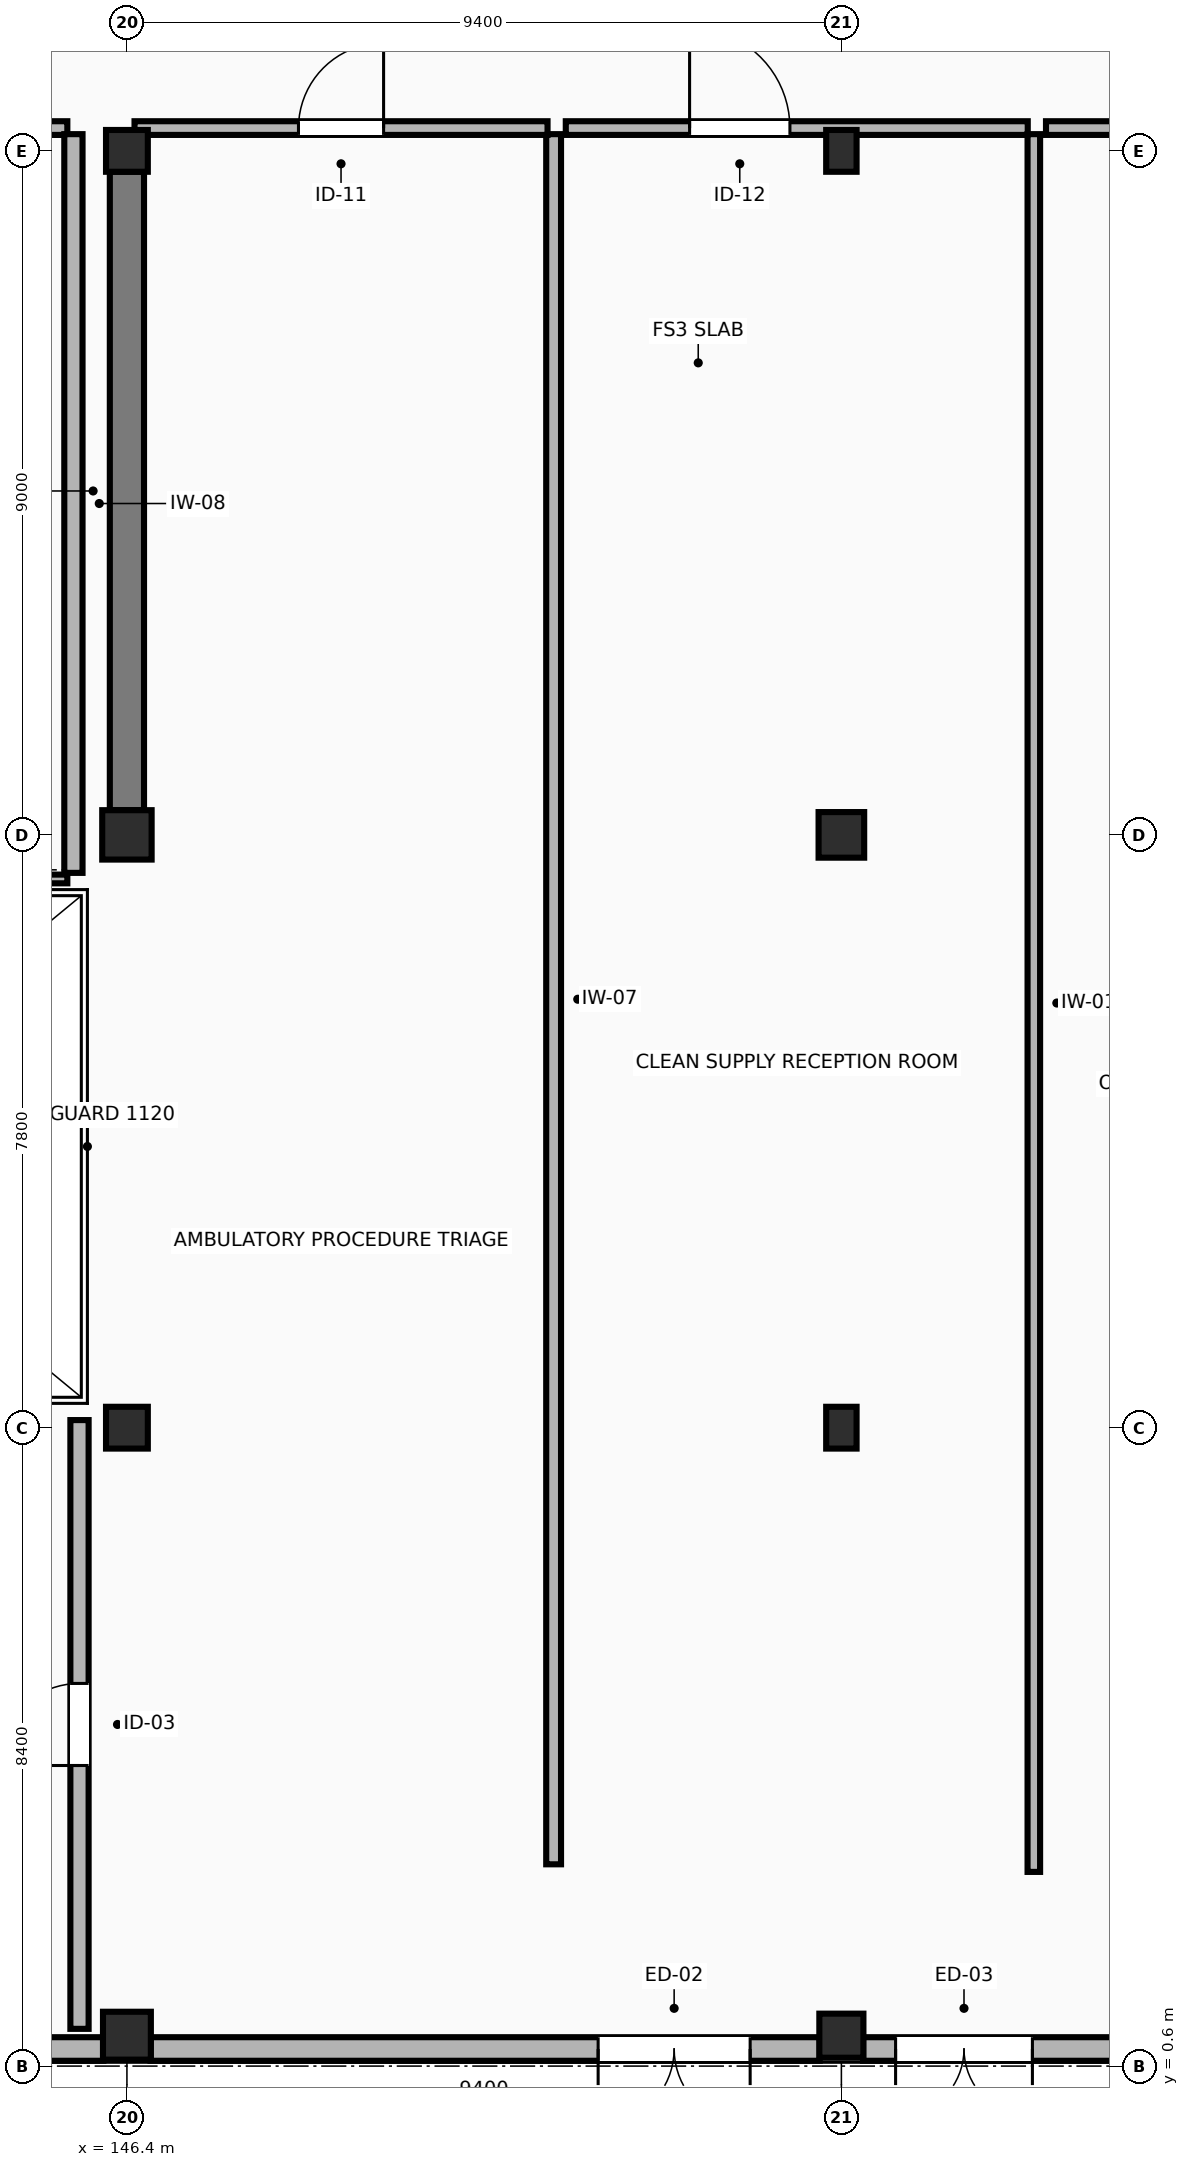
"""IFC4 building model, lengths in metres.
Left out: names, types, materials, properties, quantities, classifications, styles, units other than length and angle.
Written with IfcOpenShell. Run it as: python <this file> out.ifc"""

import sys

from ifc_helpers import new_model, si_unit, direction, frame, frame_2d, origin, origin_2d, place, context, subcontext, project, spatial, rectangle, extrude, element, fill, save


model = new_model("IFC4")
c1 = context("Model", 3, precision=1e-05, world=origin(), true_north=direction((0.0, 1.0)))
c2 = subcontext(c1, "Body", "Model", "MODEL_VIEW")
j1 = project(units=[si_unit("LENGTHUNIT", "METRE"), si_unit("PLANEANGLEUNIT", "RADIAN")], contexts=[c1])
p1 = place(None, origin())
s1 = spatial("IfcSite", under=j1, at=p1, CompositionType="ELEMENT")
p2 = place(p1, origin())
s2 = spatial("IfcBuilding", under=s1, at=p2, CompositionType="ELEMENT")
p3 = place(p2, origin())
s3 = spatial("IfcBuildingStorey", under=s2, at=p3, CompositionType="ELEMENT", Elevation=0.0)
p4 = place(p3, frame((146.4, 1.0, -1.75), z_axis=(0.0, 0.0, 1.0), x_axis=(1.0, 0.0, 0.0)))
e1 = element("IfcColumn", 1, at=p4, inside=s3, PredefinedType="COLUMN", context=c2, shape_type="SweptSolid", body=[
    extrude(rectangle(XDim=0.63, YDim=0.63, at=origin_2d()), origin(), (0.0, 0.0, 1.0), 7.15),
])
p5 = place(p3, frame((146.4, 9.0, -1.75), z_axis=(0.0, 0.0, 1.0), x_axis=(1.0, 0.0, 0.0)))
e2 = element("IfcColumn", 2, at=p5, inside=s3, PredefinedType="COLUMN", context=c2, shape_type="SweptSolid", body=[
    extrude(rectangle(XDim=0.55, YDim=0.55, at=origin_2d()), origin(), (0.0, 0.0, 1.0), 7.15),
])
p6 = place(p3, frame((146.4, 16.8, 0.0), z_axis=(0.0, 0.0, 1.0), x_axis=(1.0, 0.0, 0.0)))
e3 = element("IfcColumn", 3, at=p6, inside=s3, PredefinedType="COLUMN", context=c2, shape_type="SweptSolid", body=[
    extrude(rectangle(XDim=0.65, YDim=0.65, at=origin_2d()), origin(), (0.0, 0.0, 1.0), 5.4),
])
p7 = place(p3, frame((146.4, 25.8, 0.0), z_axis=(0.0, 0.0, 1.0), x_axis=(1.0, 0.0, 0.0)))
e4 = element("IfcColumn", 4, at=p7, inside=s3, PredefinedType="COLUMN", context=c2, shape_type="SweptSolid", body=[
    extrude(rectangle(XDim=0.55, YDim=0.55, at=origin_2d()), origin(), (0.0, 0.0, 1.0), 5.4),
])
p8 = place(p3, frame((155.8, 1.0, -1.75), z_axis=(0.0, 0.0, 1.0), x_axis=(1.0, 0.0, 0.0)))
e5 = element("IfcColumn", 5, at=p8, inside=s3, PredefinedType="COLUMN", context=c2, shape_type="SweptSolid", body=[
    extrude(rectangle(XDim=0.58, YDim=0.58, at=origin_2d()), origin(), (0.0, 0.0, 1.0), 7.15),
])
p9 = place(p3, frame((155.8, 9.0, -1.75), z_axis=(0.0, 0.0, 1.0), x_axis=(1.0, 0.0, 0.0)))
e6 = element("IfcColumn", 6, at=p9, inside=s3, PredefinedType="COLUMN", context=c2, shape_type="SweptSolid", body=[
    extrude(rectangle(XDim=0.4, YDim=0.55, at=origin_2d()), origin(), (0.0, 0.0, 1.0), 7.15),
])
p10 = place(p3, frame((155.8, 16.8, 0.0), z_axis=(0.0, 0.0, 1.0), x_axis=(1.0, 0.0, 0.0)))
e7 = element("IfcColumn", 7, at=p10, inside=s3, PredefinedType="COLUMN", context=c2, shape_type="SweptSolid", body=[
    extrude(rectangle(XDim=0.6, YDim=0.6, at=origin_2d()), origin(), (0.0, 0.0, 1.0), 5.4),
])
p11 = place(p3, frame((155.8, 25.8, 0.0), z_axis=(0.0, 0.0, 1.0), x_axis=(1.0, 0.0, 0.0)))
e8 = element("IfcColumn", 8, at=p11, inside=s3, PredefinedType="COLUMN", context=c2, shape_type="SweptSolid", body=[
    extrude(rectangle(XDim=0.4, YDim=0.55, at=origin_2d()), origin(), (0.0, 0.0, 1.0), 5.4),
])
p12 = place(p3, frame((137.405, 0.825, 0.0), z_axis=(0.0, 0.0, 1.0), x_axis=(1.0, 0.0, 0.0)))
e9 = element("IfcWall", 9, at=p12, inside=s3, PredefinedType="STANDARD", context=c2, shape_type="SweptSolid", body=[
    extrude(rectangle(XDim=8.685, YDim=0.31, at=frame_2d((4.343, 0.0))), origin(), (0.0, 0.0, 1.0), 4.42),
])
p13 = place(p12, frame((3.442, 0.0, 0.95)))
e10 = element("IfcOpeningElement", 10, at=p13, cuts=e9, PredefinedType="OPENING", context=c2, shape_type="SweptSolid", body=[
    extrude(rectangle(XDim=1.8, YDim=1.5, at=frame_2d((0.9, 0.75))), frame((0.0, 0.165, 0.0), z_axis=(0.0, -1.0, 0.0), x_axis=(1.0, 0.0, 0.0)), (0.0, 0.0, 1.0), 0.33),
])
p14 = place(p3, frame((146.71, 0.825, 0.0), z_axis=(0.0, 0.0, 1.0), x_axis=(1.0, 0.0, 0.0)))
e11 = element("IfcWall", 11, at=p14, inside=s3, PredefinedType="STANDARD", context=c2, shape_type="SweptSolid", body=[
    extrude(rectangle(XDim=8.805, YDim=0.31, at=frame_2d((4.402, 0.0))), origin(), (0.0, 0.0, 1.0), 4.42),
])
p15 = place(p14, frame((5.89, 0.0, 0.0)))
e12 = element("IfcOpeningElement", 12, at=p15, cuts=e11, PredefinedType="OPENING", context=c2, shape_type="SweptSolid", body=[
    extrude(rectangle(XDim=2.0, YDim=2.4, at=frame_2d((1.0, 1.2))), frame((0.0, 0.165, 0.0), z_axis=(0.0, -1.0, 0.0), x_axis=(1.0, 0.0, 0.0)), (0.0, 0.0, 1.0), 0.33),
])
p16 = place(p3, frame((156.085, 0.825, 0.0), z_axis=(0.0, 0.0, 1.0), x_axis=(1.0, 0.0, 0.0)))
e13 = element("IfcWall", 13, at=p16, inside=s3, PredefinedType="STANDARD", context=c2, shape_type="SweptSolid", body=[
    extrude(rectangle(XDim=8.355, YDim=0.31, at=frame_2d((4.177, 0.0))), origin(), (0.0, 0.0, 1.0), 4.42),
])
p17 = place(p16, frame((0.428, 0.0, 0.0)))
e14 = element("IfcOpeningElement", 14, at=p17, cuts=e13, PredefinedType="OPENING", context=c2, shape_type="SweptSolid", body=[
    extrude(rectangle(XDim=1.8, YDim=2.3, at=frame_2d((0.9, 1.15))), frame((0.0, 0.165, 0.0), z_axis=(0.0, -1.0, 0.0), x_axis=(1.0, 0.0, 0.0)), (0.0, 0.0, 1.0), 0.33),
])
p18 = place(p3, frame((146.4, 17.125, 0.0), z_axis=(0.0, 0.0, 1.0), x_axis=(0.0, 1.0, 0.0)))
e15 = element("IfcWall", 15, at=p18, inside=s3, PredefinedType="SHEAR", context=c2, shape_type="SweptSolid", body=[
    extrude(rectangle(XDim=8.4, YDim=0.45, at=frame_2d((4.2, 0.0))), origin(), (0.0, 0.0, 1.0), 5.1),
])
p19 = place(p3, frame((145.616, 16.22, 0.0), z_axis=(0.0, 0.0, 1.0), x_axis=(-1.0, 0.0, 0.0)))
e16 = element("IfcWall", 16, at=p19, inside=s3, PredefinedType="PARTITIONING", context=c2, shape_type="SweptSolid", body=[
    extrude(rectangle(XDim=6.078, YDim=0.115, at=frame_2d((3.039, 0.0))), origin(), (0.0, 0.0, 1.0), 5.1),
])
p20 = place(p3, frame((139.538, 26.1, 0.0), z_axis=(0.0, 0.0, 1.0), x_axis=(1.0, 0.0, 0.0)))
e17 = element("IfcWall", 17, at=p20, inside=s3, PredefinedType="PARTITIONING", context=c2, shape_type="SweptSolid", body=[
    extrude(rectangle(XDim=6.078, YDim=0.18, at=frame_2d((3.039, 0.0))), origin(), (0.0, 0.0, 1.0), 4.435),
])
p21 = place(p20, frame((2.364, 0.0, 0.0)))
e18 = element("IfcOpeningElement", 18, at=p21, cuts=e17, PredefinedType="OPENING", context=c2, shape_type="SweptSolid", body=[
    extrude(rectangle(XDim=1.35, YDim=2.2, at=frame_2d((0.675, 1.1))), frame((0.0, 0.1, 0.0), z_axis=(0.0, -1.0, 0.0), x_axis=(1.0, 0.0, 0.0)), (0.0, 0.0, 1.0), 0.2),
])
p22 = place(p3, frame((145.696, 26.02, 0.0), z_axis=(0.0, 0.0, 1.0), x_axis=(0.0, -1.0, 0.0)))
e19 = element("IfcWall", 19, at=p22, inside=s3, PredefinedType="PARTITIONING", context=c2, shape_type="SweptSolid", body=[
    extrude(rectangle(XDim=9.72, YDim=0.24, at=frame_2d((4.86, 0.0))), origin(), (0.0, 0.0, 1.0), 5.1),
])
p23 = place(p3, frame((145.776, 1.09, 0.0), z_axis=(0.0, 0.0, 1.0), x_axis=(0.0, 1.0, 0.0)))
e20 = element("IfcWall", 20, at=p23, inside=s3, PredefinedType="PARTITIONING", context=c2, shape_type="SweptSolid", body=[
    extrude(rectangle(XDim=8.01, YDim=0.24, at=frame_2d((4.005, 0.0))), origin(), (0.0, 0.0, 1.0), 5.1),
])
p24 = place(p23, frame((3.465, 0.0, 0.0)))
e21 = element("IfcOpeningElement", 21, at=p24, cuts=e20, PredefinedType="OPENING", context=c2, shape_type="SweptSolid", body=[
    extrude(rectangle(XDim=1.08, YDim=2.2, at=frame_2d((0.54, 1.1))), frame((0.0, 0.13, 0.0), z_axis=(0.0, -1.0, 0.0), x_axis=(1.0, 0.0, 0.0)), (0.0, 0.0, 1.0), 0.26),
])
p25 = place(p3, frame((152.014, 26.02, 0.0), z_axis=(0.0, 0.0, 1.0), x_axis=(0.0, -1.0, 0.0)))
e22 = element("IfcWall", 22, at=p25, inside=s3, PredefinedType="PARTITIONING", context=c2, shape_type="SweptSolid", body=[
    extrude(rectangle(XDim=22.765, YDim=0.195, at=frame_2d((11.383, 0.0))), origin(), (0.0, 0.0, 1.0), 5.1),
])
p26 = place(p3, frame((146.5, 26.1, 0.0), z_axis=(0.0, 0.0, 1.0), x_axis=(1.0, 0.0, 0.0)))
e23 = element("IfcWall", 23, at=p26, inside=s3, PredefinedType="PARTITIONING", context=c2, shape_type="SweptSolid", body=[
    extrude(rectangle(XDim=5.434, YDim=0.18, at=frame_2d((2.717, 0.0))), origin(), (0.0, 0.0, 1.0), 4.435),
])
p27 = place(p26, frame((2.157, 0.0, 0.0)))
e24 = element("IfcOpeningElement", 24, at=p27, cuts=e23, PredefinedType="OPENING", context=c2, shape_type="SweptSolid", body=[
    extrude(rectangle(XDim=1.12, YDim=2.16, at=frame_2d((0.56, 1.08))), frame((0.0, 0.1, 0.0), z_axis=(0.0, -1.0, 0.0), x_axis=(1.0, 0.0, 0.0)), (0.0, 0.0, 1.0), 0.2),
])
p28 = place(p3, frame((152.174, 26.1, 0.0), z_axis=(0.0, 0.0, 1.0), x_axis=(1.0, 0.0, 0.0)))
e25 = element("IfcWall", 25, at=p28, inside=s3, PredefinedType="PARTITIONING", context=c2, shape_type="SweptSolid", body=[
    extrude(rectangle(XDim=6.078, YDim=0.18, at=frame_2d((3.039, 0.0))), origin(), (0.0, 0.0, 1.0), 4.435),
])
p29 = place(p28, frame((1.629, 0.0, 0.0)))
e26 = element("IfcOpeningElement", 26, at=p29, cuts=e25, PredefinedType="OPENING", context=c2, shape_type="SweptSolid", body=[
    extrude(rectangle(XDim=1.32, YDim=2.22, at=frame_2d((0.66, 1.11))), frame((0.0, 0.1, 0.0), z_axis=(0.0, -1.0, 0.0), x_axis=(1.0, 0.0, 0.0)), (0.0, 0.0, 1.0), 0.2),
])
p30 = place(p3, frame((158.332, 26.02, 0.0), z_axis=(0.0, 0.0, 1.0), x_axis=(0.0, -1.0, 0.0)))
e27 = element("IfcWall", 27, at=p30, inside=s3, PredefinedType="PARTITIONING", context=c2, shape_type="SweptSolid", body=[
    extrude(rectangle(XDim=22.865, YDim=0.165, at=frame_2d((11.433, 0.0))), origin(), (0.0, 0.0, 1.0), 4.759),
])
p31 = place(p3, frame((158.492, 26.1, 0.0), z_axis=(0.0, 0.0, 1.0), x_axis=(1.0, 0.0, 0.0)))
e28 = element("IfcWall", 28, at=p31, inside=s3, PredefinedType="PARTITIONING", context=c2, shape_type="SweptSolid", body=[
    extrude(rectangle(XDim=3.953, YDim=0.18, at=frame_2d((1.977, 0.0))), origin(), (0.0, 0.0, 1.0), 4.46),
])
p32 = place(p31, frame((1.302, 0.0, 0.0)))
e29 = element("IfcOpeningElement", 29, at=p32, cuts=e28, PredefinedType="OPENING", context=c2, shape_type="SweptSolid", body=[
    extrude(rectangle(XDim=1.35, YDim=2.2, at=frame_2d((0.675, 1.1))), frame((0.0, 0.1, 0.0), z_axis=(0.0, -1.0, 0.0), x_axis=(1.0, 0.0, 0.0)), (0.0, 0.0, 1.0), 0.2),
])
p33 = place(p15, frame((2.0, 0.0, 0.0), z_axis=(0.0, 0.0, 1.0), x_axis=(-1.0, 0.0, 0.0)))
e30 = element("IfcDoor", 30, at=p33, inside=s3, OperationType="DOUBLE_DOOR_SINGLE_SWING", PredefinedType="DOOR", context=c2, shape_type="SweptSolid", body=[
    extrude(rectangle(XDim=2.0, YDim=2.4, at=frame_2d((1.0, 1.2))), frame((0.0, 0.025, 0.0), z_axis=(0.0, -1.0, 0.0), x_axis=(1.0, 0.0, 0.0)), (0.0, 0.0, 1.0), 0.05),
])
fill(e12, e30)
p34 = place(p17, frame((1.8, 0.0, 0.0), z_axis=(0.0, 0.0, 1.0), x_axis=(-1.0, 0.0, 0.0)))
e31 = element("IfcDoor", 31, at=p34, inside=s3, OperationType="DOUBLE_DOOR_SINGLE_SWING", PredefinedType="DOOR", context=c2, shape_type="SweptSolid", body=[
    extrude(rectangle(XDim=1.8, YDim=2.3, at=frame_2d((0.9, 1.15))), frame((0.0, 0.025, 0.0), z_axis=(0.0, -1.0, 0.0), x_axis=(1.0, 0.0, 0.0)), (0.0, 0.0, 1.0), 0.05),
])
fill(e14, e31)
p35 = place(p24, origin())
e32 = element("IfcDoor", 32, at=p35, inside=s3, OperationType="SINGLE_SWING_LEFT", PredefinedType="DOOR", context=c2, shape_type="SweptSolid", body=[
    extrude(rectangle(XDim=1.08, YDim=2.2, at=frame_2d((0.54, 1.1))), frame((0.0, 0.025, 0.0), z_axis=(0.0, -1.0, 0.0), x_axis=(1.0, 0.0, 0.0)), (0.0, 0.0, 1.0), 0.05),
])
fill(e21, e32)
p36 = place(p27, origin())
e33 = element("IfcDoor", 33, at=p36, inside=s3, OperationType="SINGLE_SWING_RIGHT", PredefinedType="DOOR", context=c2, shape_type="SweptSolid", body=[
    extrude(rectangle(XDim=1.12, YDim=2.16, at=frame_2d((0.56, 1.08))), frame((0.0, 0.025, 0.0), z_axis=(0.0, -1.0, 0.0), x_axis=(1.0, 0.0, 0.0)), (0.0, 0.0, 1.0), 0.05),
])
fill(e24, e33)
p37 = place(p29, origin())
e34 = element("IfcDoor", 34, at=p37, inside=s3, OperationType="SINGLE_SWING_LEFT", PredefinedType="DOOR", context=c2, shape_type="SweptSolid", body=[
    extrude(rectangle(XDim=1.32, YDim=2.22, at=frame_2d((0.66, 1.11))), frame((0.0, 0.025, 0.0), z_axis=(0.0, -1.0, 0.0), x_axis=(1.0, 0.0, 0.0)), (0.0, 0.0, 1.0), 0.05),
])
fill(e26, e34)
save(model, sys.argv[1])
